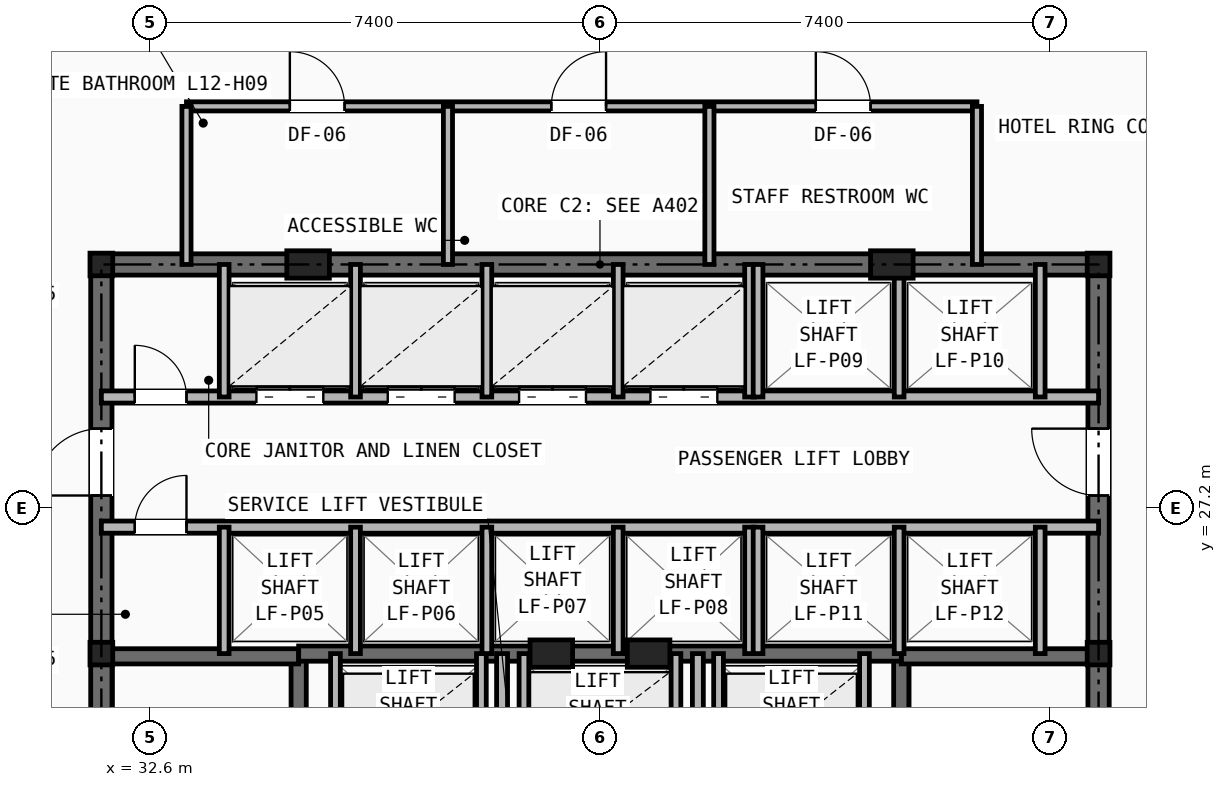
"""IFC4 building model, lengths in metres.
Left out: names, types, materials, properties, quantities, classifications, styles, units other than length and angle.
Written with IfcOpenShell. Run it as: python <this file> out.ifc"""

import sys

from ifc_helpers import new_model, si_unit, direction, frame, frame_2d, origin, origin_2d, place, context, subcontext, project, spatial, rectangle, i_section, extrude, element, fill, save


model = new_model("IFC4")
c1 = context("Model", 3, precision=1e-05, world=origin(), true_north=direction((0.0, 1.0)))
c2 = subcontext(c1, "Body", "Model", "MODEL_VIEW")
j1 = project(units=[si_unit("LENGTHUNIT", "METRE"), si_unit("PLANEANGLEUNIT", "RADIAN")], contexts=[c1])
p1 = place(None, origin())
s1 = spatial("IfcSite", under=j1, at=p1, CompositionType="ELEMENT")
p2 = place(p1, origin())
s2 = spatial("IfcBuilding", under=s1, at=p2, CompositionType="ELEMENT")
p3 = place(p2, frame((0.0, 0.0, 46.4)))
s3 = spatial("IfcBuildingStorey", under=s2, at=p3, CompositionType="ELEMENT", Elevation=46.4)
for number, where, z_axis, x_axis in (
    (1, (31.8, 24.8, 0.0), (0.0, 0.0, 1.0), (1.0, 0.0, 0.0)),
    (2, (48.2, 24.8, 0.0), (0.0, 0.0, 1.0), (1.0, 0.0, 0.0)),
    (3, (31.8, 31.2, 0.0), (0.0, 0.0, 1.0), (1.0, 0.0, 0.0)),
    (4, (48.2, 31.2, 0.0), (0.0, 0.0, 1.0), (1.0, 0.0, 0.0)),
):
    element("IfcColumn", number, at=place(p3, frame(where, z_axis=z_axis, x_axis=x_axis)), inside=s3, PredefinedType="COLUMN", context=c2, shape_type="SweptSolid", body=[
        extrude(i_section(OverallWidth=0.374, OverallDepth=0.372, WebThickness=0.016, FlangeThickness=0.026, at=origin_2d()), origin(), (0.0, 0.0, 1.0), 3.2),
    ])
for number, where, z_axis, x_axis in (
    (5, (35.2, 31.2, 0.0), (0.0, 0.0, 1.0), (1.0, 0.0, 0.0)),
    (6, (44.8, 31.2, 0.0), (0.0, 0.0, 1.0), (1.0, 0.0, 0.0)),
    (7, (39.2, 24.8, 0.0), (0.0, 0.0, 1.0), (1.0, 0.0, 0.0)),
    (8, (40.8, 24.8, 0.0), (0.0, 0.0, 1.0), (1.0, 0.0, 0.0)),
):
    element("IfcColumn", number, at=place(p3, frame(where, z_axis=z_axis, x_axis=x_axis)), inside=s3, PredefinedType="PILASTER", context=c2, shape_type="SweptSolid", body=[
        extrude(rectangle(XDim=0.7, YDim=0.45, at=origin_2d()), origin(), (0.0, 0.0, 1.0), 3.2),
    ])
p4 = place(p3, frame((31.8, 31.2, 0.0), z_axis=(0.0, 0.0, 1.0), x_axis=(1.0, 0.0, 0.0)))
e9 = element("IfcWall", 9, at=p4, inside=s3, PredefinedType="SHEAR", context=c2, shape_type="SweptSolid", body=[
    extrude(rectangle(XDim=16.4, YDim=0.35, at=frame_2d((8.2, 0.0))), origin(), (0.0, 0.0, 1.0), 2.98),
])
p5 = place(p3, frame((31.8, 16.4, 0.0), z_axis=(0.0, 0.0, 1.0), x_axis=(0.0, 1.0, 0.0)))
e10 = element("IfcWall", 10, at=p5, inside=s3, PredefinedType="SHEAR", context=c2, shape_type="SweptSolid", body=[
    extrude(rectangle(XDim=14.8, YDim=0.35, at=frame_2d((7.4, 0.0))), origin(), (0.0, 0.0, 1.0), 2.98),
])
p6 = place(p5, frame((11.0, 0.0, 0.0)))
e11 = element("IfcOpeningElement", 11, at=p6, cuts=e10, PredefinedType="OPENING", context=c2, shape_type="SweptSolid", body=[
    extrude(rectangle(XDim=1.1, YDim=2.15, at=frame_2d((0.55, 1.075))), frame((0.0, 0.185, 0.0), z_axis=(0.0, -1.0, 0.0), x_axis=(1.0, 0.0, 0.0)), (0.0, 0.0, 1.0), 0.37),
])
p7 = place(p3, frame((48.2, 16.4, 0.0), z_axis=(0.0, 0.0, 1.0), x_axis=(0.0, 1.0, 0.0)))
e12 = element("IfcWall", 12, at=p7, inside=s3, PredefinedType="SHEAR", context=c2, shape_type="SweptSolid", body=[
    extrude(rectangle(XDim=14.8, YDim=0.35, at=frame_2d((7.4, 0.0))), origin(), (0.0, 0.0, 1.0), 2.98),
])
p8 = place(p7, frame((11.0, 0.0, 0.0)))
e13 = element("IfcOpeningElement", 13, at=p8, cuts=e12, PredefinedType="OPENING", context=c2, shape_type="SweptSolid", body=[
    extrude(rectangle(XDim=1.1, YDim=2.15, at=frame_2d((0.55, 1.075))), frame((0.0, 0.185, 0.0), z_axis=(0.0, -1.0, 0.0), x_axis=(1.0, 0.0, 0.0)), (0.0, 0.0, 1.0), 0.37),
])
p9 = place(p3, frame((35.045, 16.4, 0.0), z_axis=(0.0, 0.0, 1.0), x_axis=(0.0, 1.0, 0.0)))
e14 = element("IfcWall", 14, at=p9, inside=s3, PredefinedType="SHEAR", context=c2, shape_type="SweptSolid", body=[
    extrude(rectangle(XDim=8.4, YDim=0.25, at=frame_2d((4.2, 0.0))), origin(), (0.0, 0.0, 1.0), 2.98),
])
p10 = place(p9, frame((0.45, 0.0, 0.0)))
e15 = element("IfcOpeningElement", 15, at=p10, cuts=e14, PredefinedType="OPENING", context=c2, shape_type="SweptSolid", body=[
    extrude(rectangle(XDim=0.95, YDim=2.1, at=frame_2d((0.475, 1.05))), frame((0.0, 0.135, 0.0), z_axis=(0.0, -1.0, 0.0), x_axis=(1.0, 0.0, 0.0)), (0.0, 0.0, 1.0), 0.27),
])
p11 = place(p3, frame((31.8, 24.755, 0.0), z_axis=(0.0, 0.0, 1.0), x_axis=(1.0, 0.0, 0.0)))
e16 = element("IfcWall", 16, at=p11, inside=s3, PredefinedType="SHEAR", context=c2, shape_type="SweptSolid", body=[
    extrude(rectangle(XDim=3.245, YDim=0.25, at=frame_2d((1.623, 0.0))), origin(), (0.0, 0.0, 1.0), 2.98),
])
p12 = place(p3, frame((44.955, 16.4, 0.0), z_axis=(0.0, 0.0, 1.0), x_axis=(0.0, 1.0, 0.0)))
e17 = element("IfcWall", 17, at=p12, inside=s3, PredefinedType="SHEAR", context=c2, shape_type="SweptSolid", body=[
    extrude(rectangle(XDim=8.4, YDim=0.25, at=frame_2d((4.2, 0.0))), origin(), (0.0, 0.0, 1.0), 2.98),
])
p13 = place(p12, frame((0.45, 0.0, 0.0)))
e18 = element("IfcOpeningElement", 18, at=p13, cuts=e17, PredefinedType="OPENING", context=c2, shape_type="SweptSolid", body=[
    extrude(rectangle(XDim=0.95, YDim=2.1, at=frame_2d((0.475, 1.05))), frame((0.0, 0.135, 0.0), z_axis=(0.0, -1.0, 0.0), x_axis=(1.0, 0.0, 0.0)), (0.0, 0.0, 1.0), 0.27),
])
p14 = place(p3, frame((44.955, 24.755, 0.0), z_axis=(0.0, 0.0, 1.0), x_axis=(1.0, 0.0, 0.0)))
e19 = element("IfcWall", 19, at=p14, inside=s3, PredefinedType="SHEAR", context=c2, shape_type="SweptSolid", body=[
    extrude(rectangle(XDim=3.245, YDim=0.25, at=frame_2d((1.623, 0.0))), origin(), (0.0, 0.0, 1.0), 2.98),
])
p15 = place(p3, frame((35.045, 24.8, 0.0), z_axis=(0.0, 0.0, 1.0), x_axis=(1.0, 0.0, 0.0)))
e20 = element("IfcWall", 20, at=p15, inside=s3, PredefinedType="SHEAR", context=c2, shape_type="SweptSolid", body=[
    extrude(rectangle(XDim=9.91, YDim=0.25, at=frame_2d((4.955, 0.0))), origin(), (0.0, 0.0, 1.0), 2.98),
])
p16 = place(p3, frame((38.39, 16.4, 0.0), z_axis=(0.0, 0.0, 1.0), x_axis=(0.0, 1.0, 0.0)))
e21 = element("IfcWall", 21, at=p16, inside=s3, PredefinedType="PARTITIONING", context=c2, shape_type="SweptSolid", body=[
    extrude(rectangle(XDim=8.4, YDim=0.18, at=frame_2d((4.2, 0.0))), origin(), (0.0, 0.0, 1.0), 2.431),
])
p17 = place(p16, frame((4.45, 0.0, 0.0)))
e22 = element("IfcOpeningElement", 22, at=p17, cuts=e21, PredefinedType="OPENING", context=c2, shape_type="SweptSolid", body=[
    extrude(rectangle(XDim=0.95, YDim=2.1, at=frame_2d((0.475, 1.05))), frame((0.0, 0.1, 0.0), z_axis=(0.0, -1.0, 0.0), x_axis=(1.0, 0.0, 0.0)), (0.0, 0.0, 1.0), 0.2),
])
p18 = place(p3, frame((41.61, 16.4, 0.0), z_axis=(0.0, 0.0, 1.0), x_axis=(0.0, 1.0, 0.0)))
e23 = element("IfcWall", 23, at=p18, inside=s3, PredefinedType="PARTITIONING", context=c2, shape_type="SweptSolid", body=[
    extrude(rectangle(XDim=8.4, YDim=0.18, at=frame_2d((4.2, 0.0))), origin(), (0.0, 0.0, 1.0), 2.431),
])
p19 = place(p18, frame((2.5, 0.0, 0.0)))
e24 = element("IfcOpeningElement", 24, at=p19, cuts=e23, PredefinedType="OPENING", context=c2, shape_type="SweptSolid", body=[
    extrude(rectangle(XDim=0.85, YDim=2.05, at=frame_2d((0.425, 1.025))), frame((0.0, 0.1, 0.0), z_axis=(0.0, -1.0, 0.0), x_axis=(1.0, 0.0, 0.0)), (0.0, 0.0, 1.0), 0.2),
])
for number, where, z_axis, x_axis in (
    (25, (35.65, 22.48, 0.0), (0.0, 0.0, 1.0), (0.0, 1.0, 0.0)),
    (26, (38.05, 22.48, 0.0), (0.0, 0.0, 1.0), (0.0, 1.0, 0.0)),
    (27, (41.95, 22.48, 0.0), (0.0, 0.0, 1.0), (0.0, 1.0, 0.0)),
    (28, (44.35, 22.48, 0.0), (0.0, 0.0, 1.0), (0.0, 1.0, 0.0)),
    (29, (38.75, 22.48, 0.0), (0.0, 0.0, 1.0), (0.0, 1.0, 0.0)),
    (30, (41.25, 22.48, 0.0), (0.0, 0.0, 1.0), (0.0, 1.0, 0.0)),
):
    element("IfcWall", number, at=place(p3, frame(where, z_axis=z_axis, x_axis=x_axis)), inside=s3, PredefinedType="SOLIDWALL", context=c2, shape_type="SweptSolid", body=[
        extrude(rectangle(XDim=2.32, YDim=0.16, at=frame_2d((1.16, 0.0))), origin(), (0.0, 0.0, 1.0), 2.98),
    ])
p20 = place(p3, frame((31.8, 29.02, 0.0), z_axis=(0.0, 0.0, 1.0), x_axis=(1.0, 0.0, 0.0)))
e31 = element("IfcWall", 31, at=p20, inside=s3, PredefinedType="SOLIDWALL", context=c2, shape_type="SweptSolid", body=[
    extrude(rectangle(XDim=16.4, YDim=0.2, at=frame_2d((8.2, 0.0))), origin(), (0.0, 0.0, 1.0), 2.431),
])
p21 = place(p20, frame((0.55, 0.0, 0.0)))
e32 = element("IfcOpeningElement", 32, at=p21, cuts=e31, PredefinedType="OPENING", context=c2, shape_type="SweptSolid", body=[
    extrude(rectangle(XDim=0.85, YDim=2.05, at=frame_2d((0.425, 1.025))), frame((0.0, 0.11, 0.0), z_axis=(0.0, -1.0, 0.0), x_axis=(1.0, 0.0, 0.0)), (0.0, 0.0, 1.0), 0.22),
])
p22 = place(p20, frame((2.55, 0.0, 0.0)))
e33 = element("IfcOpeningElement", 33, at=p22, cuts=e31, PredefinedType="OPENING", context=c2, shape_type="SweptSolid", body=[
    extrude(rectangle(XDim=1.1, YDim=2.15, at=frame_2d((0.55, 1.075))), frame((0.0, 0.11, 0.0), z_axis=(0.0, -1.0, 0.0), x_axis=(1.0, 0.0, 0.0)), (0.0, 0.0, 1.0), 0.22),
])
p23 = place(p20, frame((4.71, 0.0, 0.0)))
e34 = element("IfcOpeningElement", 34, at=p23, cuts=e31, PredefinedType="OPENING", context=c2, shape_type="SweptSolid", body=[
    extrude(rectangle(XDim=1.1, YDim=2.15, at=frame_2d((0.55, 1.075))), frame((0.0, 0.11, 0.0), z_axis=(0.0, -1.0, 0.0), x_axis=(1.0, 0.0, 0.0)), (0.0, 0.0, 1.0), 0.22),
])
p24 = place(p20, frame((6.87, 0.0, 0.0)))
e35 = element("IfcOpeningElement", 35, at=p24, cuts=e31, PredefinedType="OPENING", context=c2, shape_type="SweptSolid", body=[
    extrude(rectangle(XDim=1.1, YDim=2.15, at=frame_2d((0.55, 1.075))), frame((0.0, 0.11, 0.0), z_axis=(0.0, -1.0, 0.0), x_axis=(1.0, 0.0, 0.0)), (0.0, 0.0, 1.0), 0.22),
])
p25 = place(p20, frame((9.03, 0.0, 0.0)))
e36 = element("IfcOpeningElement", 36, at=p25, cuts=e31, PredefinedType="OPENING", context=c2, shape_type="SweptSolid", body=[
    extrude(rectangle(XDim=1.1, YDim=2.15, at=frame_2d((0.55, 1.075))), frame((0.0, 0.11, 0.0), z_axis=(0.0, -1.0, 0.0), x_axis=(1.0, 0.0, 0.0)), (0.0, 0.0, 1.0), 0.22),
])
p26 = place(p3, frame((31.8, 26.88, 0.0), z_axis=(0.0, 0.0, 1.0), x_axis=(1.0, 0.0, 0.0)))
e37 = element("IfcWall", 37, at=p26, inside=s3, PredefinedType="SOLIDWALL", context=c2, shape_type="SweptSolid", body=[
    extrude(rectangle(XDim=16.4, YDim=0.2, at=frame_2d((8.2, 0.0))), origin(), (0.0, 0.0, 1.0), 2.431),
])
p27 = place(p26, frame((0.55, 0.0, 0.0)))
e38 = element("IfcOpeningElement", 38, at=p27, cuts=e37, PredefinedType="OPENING", context=c2, shape_type="SweptSolid", body=[
    extrude(rectangle(XDim=0.85, YDim=2.05, at=frame_2d((0.425, 1.025))), frame((0.0, 0.11, 0.0), z_axis=(0.0, -1.0, 0.0), x_axis=(1.0, 0.0, 0.0)), (0.0, 0.0, 1.0), 0.22),
])
p28 = place(p3, frame((33.82, 29.02, 0.0), z_axis=(0.0, 0.0, 1.0), x_axis=(0.0, 1.0, 0.0)))
e39 = element("IfcWall", 39, at=p28, inside=s3, PredefinedType="SOLIDWALL", context=c2, shape_type="SweptSolid", body=[
    extrude(rectangle(XDim=2.18, YDim=0.16, at=frame_2d((1.09, 0.0))), origin(), (0.0, 0.0, 1.0), 2.431),
])
p29 = place(p3, frame((33.82, 24.8, 0.0), z_axis=(0.0, 0.0, 1.0), x_axis=(0.0, 1.0, 0.0)))
e40 = element("IfcWall", 40, at=p29, inside=s3, PredefinedType="SOLIDWALL", context=c2, shape_type="SweptSolid", body=[
    extrude(rectangle(XDim=2.08, YDim=0.16, at=frame_2d((1.04, 0.0))), origin(), (0.0, 0.0, 1.0), 2.98),
])
for number, where, z_axis, x_axis in (
    (41, (35.98, 29.02, 0.0), (0.0, 0.0, 1.0), (0.0, 1.0, 0.0)),
    (42, (38.14, 29.02, 0.0), (0.0, 0.0, 1.0), (0.0, 1.0, 0.0)),
    (43, (40.3, 29.02, 0.0), (0.0, 0.0, 1.0), (0.0, 1.0, 0.0)),
    (44, (42.46, 29.02, 0.0), (0.0, 0.0, 1.0), (0.0, 1.0, 0.0)),
):
    element("IfcWall", number, at=place(p3, frame(where, z_axis=z_axis, x_axis=x_axis)), inside=s3, PredefinedType="SOLIDWALL", context=c2, shape_type="SweptSolid", body=[
        extrude(rectangle(XDim=2.18, YDim=0.16, at=frame_2d((1.09, 0.0))), origin(), (0.0, 0.0, 1.0), 2.431),
    ])
for number, where, z_axis, x_axis in (
    (45, (35.98, 24.8, 0.0), (0.0, 0.0, 1.0), (0.0, 1.0, 0.0)),
    (46, (38.14, 24.8, 0.0), (0.0, 0.0, 1.0), (0.0, 1.0, 0.0)),
    (47, (40.3, 24.8, 0.0), (0.0, 0.0, 1.0), (0.0, 1.0, 0.0)),
    (48, (42.46, 24.8, 0.0), (0.0, 0.0, 1.0), (0.0, 1.0, 0.0)),
):
    element("IfcWall", number, at=place(p3, frame(where, z_axis=z_axis, x_axis=x_axis)), inside=s3, PredefinedType="SOLIDWALL", context=c2, shape_type="SweptSolid", body=[
        extrude(rectangle(XDim=2.08, YDim=0.16, at=frame_2d((1.04, 0.0))), origin(), (0.0, 0.0, 1.0), 2.98),
    ])
for number, where, z_axis, x_axis in (
    (49, (42.6, 29.02, 0.0), (0.0, 0.0, 1.0), (0.0, 1.0, 0.0)),
    (50, (44.92, 29.02, 0.0), (0.0, 0.0, 1.0), (0.0, 1.0, 0.0)),
    (51, (47.24, 29.02, 0.0), (0.0, 0.0, 1.0), (0.0, 1.0, 0.0)),
):
    element("IfcWall", number, at=place(p3, frame(where, z_axis=z_axis, x_axis=x_axis)), inside=s3, PredefinedType="SOLIDWALL", context=c2, shape_type="SweptSolid", body=[
        extrude(rectangle(XDim=2.18, YDim=0.16, at=frame_2d((1.09, 0.0))), origin(), (0.0, 0.0, 1.0), 2.431),
    ])
for number, where, z_axis, x_axis in (
    (52, (42.6, 24.8, 0.0), (0.0, 0.0, 1.0), (0.0, 1.0, 0.0)),
    (53, (44.92, 24.8, 0.0), (0.0, 0.0, 1.0), (0.0, 1.0, 0.0)),
    (54, (47.24, 24.8, 0.0), (0.0, 0.0, 1.0), (0.0, 1.0, 0.0)),
):
    element("IfcWall", number, at=place(p3, frame(where, z_axis=z_axis, x_axis=x_axis)), inside=s3, PredefinedType="SOLIDWALL", context=c2, shape_type="SweptSolid", body=[
        extrude(rectangle(XDim=2.08, YDim=0.16, at=frame_2d((1.04, 0.0))), origin(), (0.0, 0.0, 1.0), 2.98),
    ])
p30 = place(p3, frame((33.2, 33.8, 0.0), z_axis=(0.0, 0.0, 1.0), x_axis=(1.0, 0.0, 0.0)))
e55 = element("IfcWall", 55, at=p30, inside=s3, PredefinedType="PARTITIONING", context=c2, shape_type="SweptSolid", body=[
    extrude(rectangle(XDim=13.0, YDim=0.15, at=frame_2d((6.5, 0.0))), origin(), (0.0, 0.0, 1.0), 2.98),
])
p31 = place(p30, frame((1.7, 0.0, 0.0)))
e56 = element("IfcOpeningElement", 56, at=p31, cuts=e55, PredefinedType="OPENING", context=c2, shape_type="SweptSolid", body=[
    extrude(rectangle(XDim=0.9, YDim=2.1, at=frame_2d((0.45, 1.05))), frame((0.0, 0.085, 0.0), z_axis=(0.0, -1.0, 0.0), x_axis=(1.0, 0.0, 0.0)), (0.0, 0.0, 1.0), 0.17),
])
p32 = place(p30, frame((6.0, 0.0, 0.0)))
e57 = element("IfcOpeningElement", 57, at=p32, cuts=e55, PredefinedType="OPENING", context=c2, shape_type="SweptSolid", body=[
    extrude(rectangle(XDim=0.9, YDim=2.1, at=frame_2d((0.45, 1.05))), frame((0.0, 0.085, 0.0), z_axis=(0.0, -1.0, 0.0), x_axis=(1.0, 0.0, 0.0)), (0.0, 0.0, 1.0), 0.17),
])
p33 = place(p30, frame((10.35, 0.0, 0.0)))
e58 = element("IfcOpeningElement", 58, at=p33, cuts=e55, PredefinedType="OPENING", context=c2, shape_type="SweptSolid", body=[
    extrude(rectangle(XDim=0.9, YDim=2.1, at=frame_2d((0.45, 1.05))), frame((0.0, 0.085, 0.0), z_axis=(0.0, -1.0, 0.0), x_axis=(1.0, 0.0, 0.0)), (0.0, 0.0, 1.0), 0.17),
])
for number, where, z_axis, x_axis in (
    (59, (33.2, 31.2, 0.0), (0.0, 0.0, 1.0), (0.0, 1.0, 0.0)),
    (60, (46.2, 31.2, 0.0), (0.0, 0.0, 1.0), (0.0, 1.0, 0.0)),
    (61, (37.5, 31.2, 0.0), (0.0, 0.0, 1.0), (0.0, 1.0, 0.0)),
    (62, (41.8, 31.2, 0.0), (0.0, 0.0, 1.0), (0.0, 1.0, 0.0)),
):
    element("IfcWall", number, at=place(p3, frame(where, z_axis=z_axis, x_axis=x_axis)), inside=s3, PredefinedType="PARTITIONING", context=c2, shape_type="SweptSolid", body=[
        extrude(rectangle(XDim=2.6, YDim=0.15, at=frame_2d((1.3, 0.0))), origin(), (0.0, 0.0, 1.0), 2.431),
    ])
p34 = place(p21, origin())
e63 = element("IfcDoor", 63, at=p34, inside=s3, OperationType="SINGLE_SWING_LEFT", PredefinedType="DOOR", context=c2, shape_type="SweptSolid", body=[
    extrude(rectangle(XDim=0.85, YDim=2.05, at=frame_2d((0.425, 1.025))), frame((0.0, 0.025, 0.0), z_axis=(0.0, -1.0, 0.0), x_axis=(1.0, 0.0, 0.0)), (0.0, 0.0, 1.0), 0.05),
])
fill(e32, e63)
p35 = place(p27, origin())
e64 = element("IfcDoor", 64, at=p35, inside=s3, OperationType="SINGLE_SWING_RIGHT", PredefinedType="DOOR", context=c2, shape_type="SweptSolid", body=[
    extrude(rectangle(XDim=0.85, YDim=2.05, at=frame_2d((0.425, 1.025))), frame((0.0, 0.025, 0.0), z_axis=(0.0, -1.0, 0.0), x_axis=(1.0, 0.0, 0.0)), (0.0, 0.0, 1.0), 0.05),
])
fill(e38, e64)
p36 = place(p6, origin())
e65 = element("IfcDoor", 65, at=p36, inside=s3, OperationType="SINGLE_SWING_LEFT", PredefinedType="DOOR", context=c2, shape_type="SweptSolid", body=[
    extrude(rectangle(XDim=1.1, YDim=2.15, at=frame_2d((0.55, 1.075))), frame((0.0, 0.025, 0.0), z_axis=(0.0, -1.0, 0.0), x_axis=(1.0, 0.0, 0.0)), (0.0, 0.0, 1.0), 0.05),
])
fill(e11, e65)
p37 = place(p8, origin())
e66 = element("IfcDoor", 66, at=p37, inside=s3, OperationType="SINGLE_SWING_RIGHT", PredefinedType="DOOR", context=c2, shape_type="SweptSolid", body=[
    extrude(rectangle(XDim=1.1, YDim=2.15, at=frame_2d((0.55, 1.075))), frame((0.0, 0.025, 0.0), z_axis=(0.0, -1.0, 0.0), x_axis=(1.0, 0.0, 0.0)), (0.0, 0.0, 1.0), 0.05),
])
fill(e13, e66)
p38 = place(p22, origin())
e67 = element("IfcDoor", 67, at=p38, inside=s3, OperationType="DOUBLE_DOOR_SLIDING", PredefinedType="DOOR", context=c2, shape_type="SweptSolid", body=[
    extrude(rectangle(XDim=1.1, YDim=2.15, at=frame_2d((0.55, 1.075))), frame((0.0, 0.025, 0.0), z_axis=(0.0, -1.0, 0.0), x_axis=(1.0, 0.0, 0.0)), (0.0, 0.0, 1.0), 0.05),
])
fill(e33, e67)
p39 = place(p23, origin())
e68 = element("IfcDoor", 68, at=p39, inside=s3, OperationType="DOUBLE_DOOR_SLIDING", PredefinedType="DOOR", context=c2, shape_type="SweptSolid", body=[
    extrude(rectangle(XDim=1.1, YDim=2.15, at=frame_2d((0.55, 1.075))), frame((0.0, 0.025, 0.0), z_axis=(0.0, -1.0, 0.0), x_axis=(1.0, 0.0, 0.0)), (0.0, 0.0, 1.0), 0.05),
])
fill(e34, e68)
p40 = place(p24, origin())
e69 = element("IfcDoor", 69, at=p40, inside=s3, OperationType="DOUBLE_DOOR_SLIDING", PredefinedType="DOOR", context=c2, shape_type="SweptSolid", body=[
    extrude(rectangle(XDim=1.1, YDim=2.15, at=frame_2d((0.55, 1.075))), frame((0.0, 0.025, 0.0), z_axis=(0.0, -1.0, 0.0), x_axis=(1.0, 0.0, 0.0)), (0.0, 0.0, 1.0), 0.05),
])
fill(e35, e69)
p41 = place(p25, origin())
e70 = element("IfcDoor", 70, at=p41, inside=s3, OperationType="DOUBLE_DOOR_SLIDING", PredefinedType="DOOR", context=c2, shape_type="SweptSolid", body=[
    extrude(rectangle(XDim=1.1, YDim=2.15, at=frame_2d((0.55, 1.075))), frame((0.0, 0.025, 0.0), z_axis=(0.0, -1.0, 0.0), x_axis=(1.0, 0.0, 0.0)), (0.0, 0.0, 1.0), 0.05),
])
fill(e36, e70)
p42 = place(p31, origin())
e71 = element("IfcDoor", 71, at=p42, inside=s3, OperationType="SINGLE_SWING_LEFT", PredefinedType="DOOR", context=c2, shape_type="SweptSolid", body=[
    extrude(rectangle(XDim=0.9, YDim=2.1, at=frame_2d((0.45, 1.05))), frame((0.0, 0.025, 0.0), z_axis=(0.0, -1.0, 0.0), x_axis=(1.0, 0.0, 0.0)), (0.0, 0.0, 1.0), 0.05),
])
fill(e56, e71)
p43 = place(p32, origin())
e72 = element("IfcDoor", 72, at=p43, inside=s3, OperationType="SINGLE_SWING_RIGHT", PredefinedType="DOOR", context=c2, shape_type="SweptSolid", body=[
    extrude(rectangle(XDim=0.9, YDim=2.1, at=frame_2d((0.45, 1.05))), frame((0.0, 0.025, 0.0), z_axis=(0.0, -1.0, 0.0), x_axis=(1.0, 0.0, 0.0)), (0.0, 0.0, 1.0), 0.05),
])
fill(e57, e72)
p44 = place(p33, origin())
e73 = element("IfcDoor", 73, at=p44, inside=s3, OperationType="SINGLE_SWING_LEFT", PredefinedType="DOOR", context=c2, shape_type="SweptSolid", body=[
    extrude(rectangle(XDim=0.9, YDim=2.1, at=frame_2d((0.45, 1.05))), frame((0.0, 0.025, 0.0), z_axis=(0.0, -1.0, 0.0), x_axis=(1.0, 0.0, 0.0)), (0.0, 0.0, 1.0), 0.05),
])
fill(e58, e73)
save(model, sys.argv[1])
